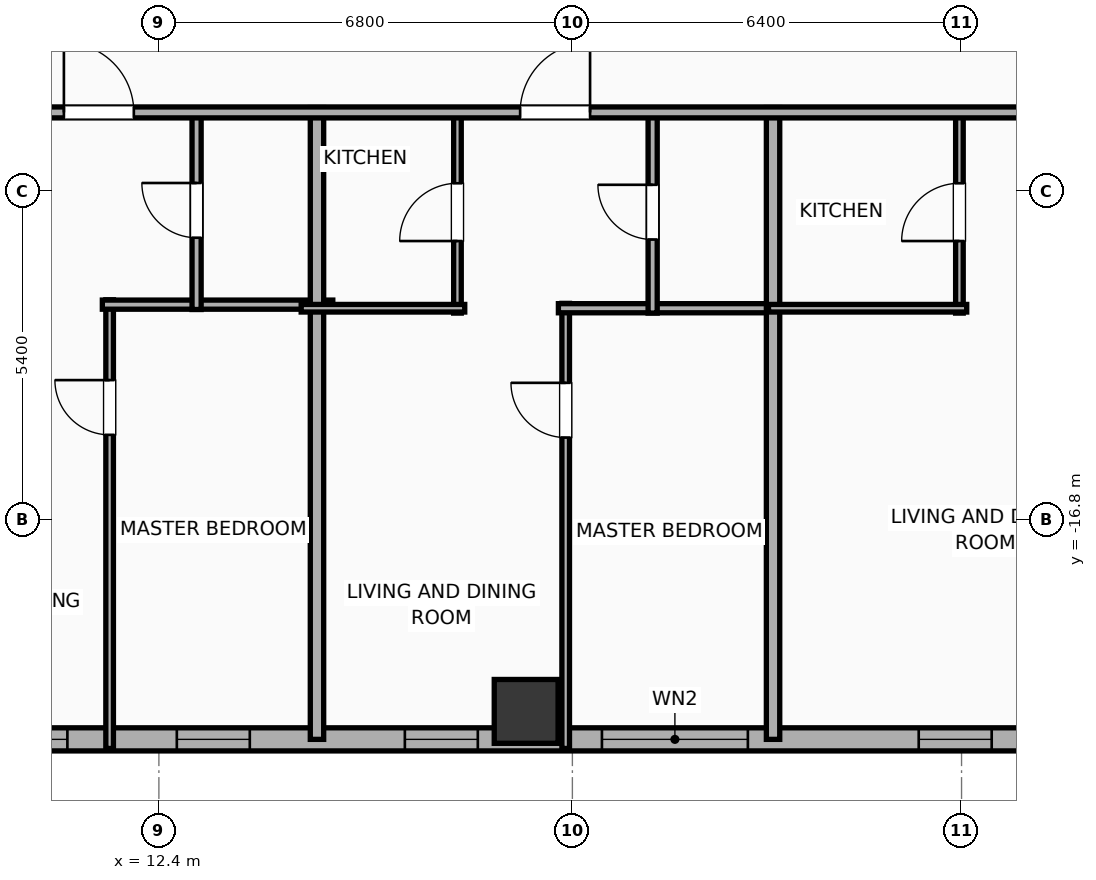
"""IFC4 building model, lengths in metres.
Left out: names, types, materials, properties, quantities, classifications, styles, units other than length and angle.
Written with IfcOpenShell. Run it as: python <this file> out.ifc"""

import sys

from ifc_helpers import new_model, si_unit, direction, frame, frame_2d, origin, origin_2d, place, context, subcontext, project, spatial, rectangle, hollow_rectangle, extrude, element, fill, save


model = new_model("IFC4")
c1 = context("Model", 3, precision=1e-05, world=origin(), true_north=direction((0.0, 1.0)))
c2 = subcontext(c1, "Body", "Model", "MODEL_VIEW")
j1 = project(units=[si_unit("LENGTHUNIT", "METRE"), si_unit("PLANEANGLEUNIT", "RADIAN")], contexts=[c1])
p1 = place(None, origin())
s1 = spatial("IfcSite", under=j1, at=p1, CompositionType="ELEMENT")
p2 = place(p1, origin())
s2 = spatial("IfcBuilding", under=s1, at=p2, CompositionType="ELEMENT")
p3 = place(p2, frame((0.0, 0.0, 136.5)))
s3 = spatial("IfcBuildingStorey", under=s2, at=p3, CompositionType="ELEMENT", Elevation=136.5)
p4 = place(p3, frame((18.44, -19.95, 0.0), z_axis=(0.0, 0.0, 1.0), x_axis=(1.0, 0.0, 0.0)))
e1 = element("IfcColumn", 1, at=p4, inside=s3, PredefinedType="COLUMN", context=c2, shape_type="SweptSolid", body=[
    extrude(hollow_rectangle(XDim=1.05, YDim=1.05, WallThickness=0.036, at=origin_2d()), origin(), (0.0, 0.0, 1.0), 3.865),
])
p5 = place(p3, frame((29.381, -20.41, 0.0), z_axis=(0.0, 0.0, 1.0), x_axis=(-1.0, 0.0, 0.0)))
e2 = element("IfcWall", 2, at=p5, inside=s3, PredefinedType="ELEMENTEDWALL", context=c2, shape_type="SweptSolid", body=[
    extrude(rectangle(XDim=54.763, YDim=0.38, at=frame_2d((27.381, 0.0))), origin(), (0.0, 0.0, 1.0), 2.39),
])
p6 = place(p5, frame((7.295, 0.0, 0.75)))
e3 = element("IfcOpeningElement", 3, at=p6, cuts=e2, PredefinedType="OPENING", context=c2, shape_type="SweptSolid", body=[
    extrude(rectangle(XDim=2.4, YDim=1.45, at=frame_2d((1.2, 0.725))), frame((0.0, 0.2, 0.0), z_axis=(0.0, -1.0, 0.0), x_axis=(1.0, 0.0, 0.0)), (0.0, 0.0, 1.0), 0.4),
])
p7 = place(p5, frame((18.486, 0.0, 0.75)))
e4 = element("IfcOpeningElement", 4, at=p7, cuts=e2, PredefinedType="OPENING", context=c2, shape_type="SweptSolid", body=[
    extrude(rectangle(XDim=2.4, YDim=1.45, at=frame_2d((1.2, 0.725))), frame((0.0, 0.2, 0.0), z_axis=(0.0, -1.0, 0.0), x_axis=(1.0, 0.0, 0.0)), (0.0, 0.0, 1.0), 0.4),
])
p8 = place(p5, frame((33.877, 0.0, 0.75)))
e5 = element("IfcOpeningElement", 5, at=p8, cuts=e2, PredefinedType="OPENING", context=c2, shape_type="SweptSolid", body=[
    extrude(rectangle(XDim=2.4, YDim=1.45, at=frame_2d((1.2, 0.725))), frame((0.0, 0.2, 0.0), z_axis=(0.0, -1.0, 0.0), x_axis=(1.0, 0.0, 0.0)), (0.0, 0.0, 1.0), 0.4),
])
p9 = place(p5, frame((48.367, 0.0, 0.75)))
e6 = element("IfcOpeningElement", 6, at=p9, cuts=e2, PredefinedType="OPENING", context=c2, shape_type="SweptSolid", body=[
    extrude(rectangle(XDim=2.4, YDim=1.45, at=frame_2d((1.2, 0.725))), frame((0.0, 0.2, 0.0), z_axis=(0.0, -1.0, 0.0), x_axis=(1.0, 0.0, 0.0)), (0.0, 0.0, 1.0), 0.4),
])
p10 = place(p5, frame((52.277, 0.0, 0.55)))
e7 = element("IfcOpeningElement", 7, at=p10, cuts=e2, PredefinedType="OPENING", context=c2, shape_type="SweptSolid", body=[
    extrude(rectangle(XDim=1.2, YDim=1.15, at=frame_2d((0.6, 0.575))), frame((0.0, 0.2, 0.0), z_axis=(0.0, -1.0, 0.0), x_axis=(1.0, 0.0, 0.0)), (0.0, 0.0, 1.0), 0.4),
])
p11 = place(p5, frame((45.486, 0.0, 0.55)))
e8 = element("IfcOpeningElement", 8, at=p11, cuts=e2, PredefinedType="OPENING", context=c2, shape_type="SweptSolid", body=[
    extrude(rectangle(XDim=1.2, YDim=1.15, at=frame_2d((0.6, 0.575))), frame((0.0, 0.2, 0.0), z_axis=(0.0, -1.0, 0.0), x_axis=(1.0, 0.0, 0.0)), (0.0, 0.0, 1.0), 0.4),
])
p12 = place(p5, frame((41.736, 0.0, 0.55)))
e9 = element("IfcOpeningElement", 9, at=p12, cuts=e2, PredefinedType="OPENING", context=c2, shape_type="SweptSolid", body=[
    extrude(rectangle(XDim=1.2, YDim=1.15, at=frame_2d((0.6, 0.575))), frame((0.0, 0.2, 0.0), z_axis=(0.0, -1.0, 0.0), x_axis=(1.0, 0.0, 0.0)), (0.0, 0.0, 1.0), 0.4),
])
p13 = place(p5, frame((37.986, 0.0, 0.55)))
e10 = element("IfcOpeningElement", 10, at=p13, cuts=e2, PredefinedType="OPENING", context=c2, shape_type="SweptSolid", body=[
    extrude(rectangle(XDim=1.2, YDim=1.15, at=frame_2d((0.6, 0.575))), frame((0.0, 0.2, 0.0), z_axis=(0.0, -1.0, 0.0), x_axis=(1.0, 0.0, 0.0)), (0.0, 0.0, 1.0), 0.4),
])
p14 = place(p5, frame((30.486, 0.0, 0.55)))
e11 = element("IfcOpeningElement", 11, at=p14, cuts=e2, PredefinedType="OPENING", context=c2, shape_type="SweptSolid", body=[
    extrude(rectangle(XDim=1.2, YDim=1.15, at=frame_2d((0.6, 0.575))), frame((0.0, 0.2, 0.0), z_axis=(0.0, -1.0, 0.0), x_axis=(1.0, 0.0, 0.0)), (0.0, 0.0, 1.0), 0.4),
])
p15 = place(p5, frame((26.736, 0.0, 0.55)))
e12 = element("IfcOpeningElement", 12, at=p15, cuts=e2, PredefinedType="OPENING", context=c2, shape_type="SweptSolid", body=[
    extrude(rectangle(XDim=1.2, YDim=1.15, at=frame_2d((0.6, 0.575))), frame((0.0, 0.2, 0.0), z_axis=(0.0, -1.0, 0.0), x_axis=(1.0, 0.0, 0.0)), (0.0, 0.0, 1.0), 0.4),
])
p16 = place(p5, frame((22.986, 0.0, 0.55)))
e13 = element("IfcOpeningElement", 13, at=p16, cuts=e2, PredefinedType="OPENING", context=c2, shape_type="SweptSolid", body=[
    extrude(rectangle(XDim=1.2, YDim=1.15, at=frame_2d((0.6, 0.575))), frame((0.0, 0.2, 0.0), z_axis=(0.0, -1.0, 0.0), x_axis=(1.0, 0.0, 0.0)), (0.0, 0.0, 1.0), 0.4),
])
p17 = place(p5, frame((15.486, 0.0, 0.55)))
e14 = element("IfcOpeningElement", 14, at=p17, cuts=e2, PredefinedType="OPENING", context=c2, shape_type="SweptSolid", body=[
    extrude(rectangle(XDim=1.2, YDim=1.15, at=frame_2d((0.6, 0.575))), frame((0.0, 0.2, 0.0), z_axis=(0.0, -1.0, 0.0), x_axis=(1.0, 0.0, 0.0)), (0.0, 0.0, 1.0), 0.4),
])
p18 = place(p5, frame((11.736, 0.0, 0.55)))
e15 = element("IfcOpeningElement", 15, at=p18, cuts=e2, PredefinedType="OPENING", context=c2, shape_type="SweptSolid", body=[
    extrude(rectangle(XDim=1.2, YDim=1.15, at=frame_2d((0.6, 0.575))), frame((0.0, 0.2, 0.0), z_axis=(0.0, -1.0, 0.0), x_axis=(1.0, 0.0, 0.0)), (0.0, 0.0, 1.0), 0.4),
])
p19 = place(p5, frame((3.286, 0.0, 0.55)))
e16 = element("IfcOpeningElement", 16, at=p19, cuts=e2, PredefinedType="OPENING", context=c2, shape_type="SweptSolid", body=[
    extrude(rectangle(XDim=1.2, YDim=1.15, at=frame_2d((0.6, 0.575))), frame((0.0, 0.2, 0.0), z_axis=(0.0, -1.0, 0.0), x_axis=(1.0, 0.0, 0.0)), (0.0, 0.0, 1.0), 0.4),
])
p20 = place(p3, frame((11.59, -20.56, 0.0), z_axis=(0.0, 0.0, 1.0), x_axis=(0.0, 1.0, 0.0)))
e17 = element("IfcWall", 17, at=p20, inside=s3, PredefinedType="PARTITIONING", context=c2, shape_type="SweptSolid", body=[
    extrude(rectangle(XDim=7.379, YDim=0.125, at=frame_2d((3.689, 0.0))), origin(), (0.0, 0.0, 1.0), 3.5),
])
p21 = place(p20, frame((5.158, 0.0, 0.0)))
e18 = element("IfcOpeningElement", 18, at=p21, cuts=e17, PredefinedType="OPENING", context=c2, shape_type="SweptSolid", body=[
    extrude(rectangle(XDim=0.9, YDim=2.05, at=frame_2d((0.45, 1.025))), frame((0.0, 0.073, 0.0), z_axis=(0.0, -1.0, 0.0), x_axis=(1.0, 0.0, 0.0)), (0.0, 0.0, 1.0), 0.145),
])
p22 = place(p3, frame((11.47, -13.261, 0.0), z_axis=(0.0, 0.0, 1.0), x_axis=(1.0, 0.0, 0.0)))
e19 = element("IfcWall", 19, at=p22, inside=s3, PredefinedType="PLUMBINGWALL", context=c2, shape_type="SweptSolid", body=[
    extrude(rectangle(XDim=3.79, YDim=0.15, at=frame_2d((1.895, 0.0))), origin(), (0.0, 0.0, 1.0), 3.5),
])
p23 = place(p3, frame((13.02, -13.341, 0.0), z_axis=(0.0, 0.0, 1.0), x_axis=(0.0, 1.0, 0.0)))
e20 = element("IfcWall", 20, at=p23, inside=s3, PredefinedType="PLUMBINGWALL", context=c2, shape_type="SweptSolid", body=[
    extrude(rectangle(XDim=3.261, YDim=0.15, at=frame_2d((1.63, 0.0))), origin(), (0.0, 0.0, 1.0), 3.5),
])
p24 = place(p23, frame((1.18, 0.0, 0.0)))
e21 = element("IfcOpeningElement", 21, at=p24, cuts=e20, PredefinedType="OPENING", context=c2, shape_type="SweptSolid", body=[
    extrude(rectangle(XDim=0.9, YDim=2.05, at=frame_2d((0.45, 1.025))), frame((0.0, 0.085, 0.0), z_axis=(0.0, -1.0, 0.0), x_axis=(1.0, 0.0, 0.0)), (0.0, 0.0, 1.0), 0.17),
])
p25 = place(p3, frame((15.0, -20.41, 0.0), z_axis=(0.0, 0.0, 1.0), x_axis=(0.0, 1.0, 0.0)))
e22 = element("IfcWall", 22, at=p25, inside=s3, PredefinedType="PARTITIONING", context=c2, shape_type="SweptSolid", body=[
    extrude(rectangle(XDim=10.39, YDim=0.22, at=frame_2d((5.195, 0.0))), origin(), (0.0, 0.0, 1.0), 2.39),
])
p26 = place(p3, frame((19.09, -20.56, 0.0), z_axis=(0.0, 0.0, 1.0), x_axis=(0.0, 1.0, 0.0)))
e23 = element("IfcWall", 23, at=p26, inside=s3, PredefinedType="PARTITIONING", context=c2, shape_type="SweptSolid", body=[
    extrude(rectangle(XDim=7.32, YDim=0.125, at=frame_2d((3.66, 0.0))), origin(), (0.0, 0.0, 1.0), 2.39),
])
p27 = place(p26, frame((5.113, 0.0, 0.0)))
e24 = element("IfcOpeningElement", 24, at=p27, cuts=e23, PredefinedType="OPENING", context=c2, shape_type="SweptSolid", body=[
    extrude(rectangle(XDim=0.9, YDim=2.05, at=frame_2d((0.45, 1.025))), frame((0.0, 0.073, 0.0), z_axis=(0.0, -1.0, 0.0), x_axis=(1.0, 0.0, 0.0)), (0.0, 0.0, 1.0), 0.145),
])
p28 = place(p3, frame((18.97, -13.32, 0.0), z_axis=(0.0, 0.0, 1.0), x_axis=(1.0, 0.0, 0.0)))
e25 = element("IfcWall", 25, at=p28, inside=s3, PredefinedType="PLUMBINGWALL", context=c2, shape_type="SweptSolid", body=[
    extrude(rectangle(XDim=3.605, YDim=0.15, at=frame_2d((1.802, 0.0))), origin(), (0.0, 0.0, 1.0), 3.5),
])
p29 = place(p3, frame((17.31, -13.4, 0.0), z_axis=(0.0, 0.0, 1.0), x_axis=(0.0, 1.0, 0.0)))
e26 = element("IfcWall", 26, at=p29, inside=s3, PredefinedType="PARTITIONING", context=c2, shape_type="SweptSolid", body=[
    extrude(rectangle(XDim=3.32, YDim=0.125, at=frame_2d((1.66, 0.0))), origin(), (0.0, 0.0, 1.0), 3.5),
])
p30 = place(p29, frame((1.185, 0.0, 0.0)))
e27 = element("IfcOpeningElement", 27, at=p30, cuts=e26, PredefinedType="OPENING", context=c2, shape_type="SweptSolid", body=[
    extrude(rectangle(XDim=0.95, YDim=2.05, at=frame_2d((0.475, 1.025))), frame((0.0, 0.073, 0.0), z_axis=(0.0, -1.0, 0.0), x_axis=(1.0, 0.0, 0.0)), (0.0, 0.0, 1.0), 0.145),
])
p31 = place(p3, frame((14.74, -13.32, 0.0), z_axis=(0.0, 0.0, 1.0), x_axis=(1.0, 0.0, 0.0)))
e28 = element("IfcWall", 28, at=p31, inside=s3, PredefinedType="PARTITIONING", context=c2, shape_type="SweptSolid", body=[
    extrude(rectangle(XDim=2.69, YDim=0.125, at=frame_2d((1.345, 0.0))), origin(), (0.0, 0.0, 1.0), 3.5),
])
p32 = place(p3, frame((20.52, -13.4, 0.0), z_axis=(0.0, 0.0, 1.0), x_axis=(0.0, 1.0, 0.0)))
e29 = element("IfcWall", 29, at=p32, inside=s3, PredefinedType="PLUMBINGWALL", context=c2, shape_type="SweptSolid", body=[
    extrude(rectangle(XDim=3.32, YDim=0.15, at=frame_2d((1.66, 0.0))), origin(), (0.0, 0.0, 1.0), 3.5),
])
p33 = place(p32, frame((1.21, 0.0, 0.0)))
e30 = element("IfcOpeningElement", 30, at=p33, cuts=e29, PredefinedType="OPENING", context=c2, shape_type="SweptSolid", body=[
    extrude(rectangle(XDim=0.9, YDim=2.05, at=frame_2d((0.45, 1.025))), frame((0.0, 0.085, 0.0), z_axis=(0.0, -1.0, 0.0), x_axis=(1.0, 0.0, 0.0)), (0.0, 0.0, 1.0), 0.17),
])
p34 = place(p3, frame((22.5, -20.41, 0.0), z_axis=(0.0, 0.0, 1.0), x_axis=(0.0, 1.0, 0.0)))
e31 = element("IfcWall", 31, at=p34, inside=s3, PredefinedType="PARTITIONING", context=c2, shape_type="SweptSolid", body=[
    extrude(rectangle(XDim=10.39, YDim=0.22, at=frame_2d((5.195, 0.0))), origin(), (0.0, 0.0, 1.0), 3.5),
])
p35 = place(p3, frame((25.565, -13.4, 0.0), z_axis=(0.0, 0.0, 1.0), x_axis=(0.0, 1.0, 0.0)))
e32 = element("IfcWall", 32, at=p35, inside=s3, PredefinedType="PARTITIONING", context=c2, shape_type="SweptSolid", body=[
    extrude(rectangle(XDim=3.32, YDim=0.125, at=frame_2d((1.66, 0.0))), origin(), (0.0, 0.0, 1.0), 3.5),
])
p36 = place(p35, frame((1.185, 0.0, 0.0)))
e33 = element("IfcOpeningElement", 33, at=p36, cuts=e32, PredefinedType="OPENING", context=c2, shape_type="SweptSolid", body=[
    extrude(rectangle(XDim=0.95, YDim=2.05, at=frame_2d((0.475, 1.025))), frame((0.0, 0.073, 0.0), z_axis=(0.0, -1.0, 0.0), x_axis=(1.0, 0.0, 0.0)), (0.0, 0.0, 1.0), 0.145),
])
p37 = place(p3, frame((22.425, -13.32, 0.0), z_axis=(0.0, 0.0, 1.0), x_axis=(1.0, 0.0, 0.0)))
e34 = element("IfcWall", 34, at=p37, inside=s3, PredefinedType="PARTITIONING", context=c2, shape_type="SweptSolid", body=[
    extrude(rectangle(XDim=3.26, YDim=0.125, at=frame_2d((1.63, 0.0))), origin(), (0.0, 0.0, 1.0), 3.5),
])
p38 = place(p3, frame((-29.21, -10.1, 0.0), z_axis=(0.0, 0.0, 1.0), x_axis=(1.0, 0.0, 0.0)))
e35 = element("IfcWall", 35, at=p38, inside=s3, PredefinedType="PARTITIONING", context=c2, shape_type="SweptSolid", body=[
    extrude(rectangle(XDim=62.42, YDim=0.18, at=frame_2d((31.21, 0.0))), origin(), (0.0, 0.0, 1.0), 2.39),
])
p39 = place(p38, frame((3.002, 0.0, 0.0)))
e36 = element("IfcOpeningElement", 36, at=p39, cuts=e35, PredefinedType="OPENING", context=c2, shape_type="SweptSolid", body=[
    extrude(rectangle(XDim=0.9, YDim=2.05, at=frame_2d((0.45, 1.025))), frame((0.0, 0.1, 0.0), z_axis=(0.0, -1.0, 0.0), x_axis=(1.0, 0.0, 0.0)), (0.0, 0.0, 1.0), 0.2),
])
p40 = place(p38, frame((10.049, 0.0, 0.0)))
e37 = element("IfcOpeningElement", 37, at=p40, cuts=e35, PredefinedType="OPENING", context=c2, shape_type="SweptSolid", body=[
    extrude(rectangle(XDim=1.15, YDim=2.05, at=frame_2d((0.575, 1.025))), frame((0.0, 0.1, 0.0), z_axis=(0.0, -1.0, 0.0), x_axis=(1.0, 0.0, 0.0)), (0.0, 0.0, 1.0), 0.2),
])
p41 = place(p38, frame((17.552, 0.0, 0.0)))
e38 = element("IfcOpeningElement", 38, at=p41, cuts=e35, PredefinedType="OPENING", context=c2, shape_type="SweptSolid", body=[
    extrude(rectangle(XDim=1.15, YDim=2.05, at=frame_2d((0.575, 1.025))), frame((0.0, 0.1, 0.0), z_axis=(0.0, -1.0, 0.0), x_axis=(1.0, 0.0, 0.0)), (0.0, 0.0, 1.0), 0.2),
])
p42 = place(p38, frame((25.048, 0.0, 0.0)))
e39 = element("IfcOpeningElement", 39, at=p42, cuts=e35, PredefinedType="OPENING", context=c2, shape_type="SweptSolid", body=[
    extrude(rectangle(XDim=1.15, YDim=2.05, at=frame_2d((0.575, 1.025))), frame((0.0, 0.1, 0.0), z_axis=(0.0, -1.0, 0.0), x_axis=(1.0, 0.0, 0.0)), (0.0, 0.0, 1.0), 0.2),
])
p43 = place(p38, frame((32.551, 0.0, 0.0)))
e40 = element("IfcOpeningElement", 40, at=p43, cuts=e35, PredefinedType="OPENING", context=c2, shape_type="SweptSolid", body=[
    extrude(rectangle(XDim=1.15, YDim=2.05, at=frame_2d((0.575, 1.025))), frame((0.0, 0.1, 0.0), z_axis=(0.0, -1.0, 0.0), x_axis=(1.0, 0.0, 0.0)), (0.0, 0.0, 1.0), 0.2),
])
p44 = place(p38, frame((40.048, 0.0, 0.0)))
e41 = element("IfcOpeningElement", 41, at=p44, cuts=e35, PredefinedType="OPENING", context=c2, shape_type="SweptSolid", body=[
    extrude(rectangle(XDim=1.15, YDim=2.05, at=frame_2d((0.575, 1.025))), frame((0.0, 0.1, 0.0), z_axis=(0.0, -1.0, 0.0), x_axis=(1.0, 0.0, 0.0)), (0.0, 0.0, 1.0), 0.2),
])
p45 = place(p38, frame((47.551, 0.0, 0.0)))
e42 = element("IfcOpeningElement", 42, at=p45, cuts=e35, PredefinedType="OPENING", context=c2, shape_type="SweptSolid", body=[
    extrude(rectangle(XDim=1.15, YDim=2.05, at=frame_2d((0.575, 1.025))), frame((0.0, 0.1, 0.0), z_axis=(0.0, -1.0, 0.0), x_axis=(1.0, 0.0, 0.0)), (0.0, 0.0, 1.0), 0.2),
])
p46 = place(p38, frame((57.064, 0.0, 0.0)))
e43 = element("IfcOpeningElement", 43, at=p46, cuts=e35, PredefinedType="OPENING", context=c2, shape_type="SweptSolid", body=[
    extrude(rectangle(XDim=1.15, YDim=2.05, at=frame_2d((0.575, 1.025))), frame((0.0, 0.1, 0.0), z_axis=(0.0, -1.0, 0.0), x_axis=(1.0, 0.0, 0.0)), (0.0, 0.0, 1.0), 0.2),
])
p47 = place(p6, origin())
e44 = element("IfcWindow", 44, at=p47, inside=s3, PartitioningType="SINGLE_PANEL", PredefinedType="WINDOW", context=c2, shape_type="SweptSolid", body=[
    extrude(rectangle(XDim=2.4, YDim=1.45, at=frame_2d((1.2, 0.725))), frame((0.0, 0.03, 0.0), z_axis=(0.0, -1.0, 0.0), x_axis=(1.0, 0.0, 0.0)), (0.0, 0.0, 1.0), 0.06),
])
fill(e3, e44)
p48 = place(p7, origin())
e45 = element("IfcWindow", 45, at=p48, inside=s3, PartitioningType="SINGLE_PANEL", PredefinedType="WINDOW", context=c2, shape_type="SweptSolid", body=[
    extrude(rectangle(XDim=2.4, YDim=1.45, at=frame_2d((1.2, 0.725))), frame((0.0, 0.03, 0.0), z_axis=(0.0, -1.0, 0.0), x_axis=(1.0, 0.0, 0.0)), (0.0, 0.0, 1.0), 0.06),
])
fill(e4, e45)
p49 = place(p17, origin())
e46 = element("IfcWindow", 46, at=p49, inside=s3, PartitioningType="SINGLE_PANEL", PredefinedType="WINDOW", context=c2, shape_type="SweptSolid", body=[
    extrude(rectangle(XDim=1.2, YDim=1.15, at=frame_2d((0.6, 0.575))), frame((0.0, 0.03, 0.0), z_axis=(0.0, -1.0, 0.0), x_axis=(1.0, 0.0, 0.0)), (0.0, 0.0, 1.0), 0.06),
])
fill(e14, e46)
p50 = place(p18, origin())
e47 = element("IfcWindow", 47, at=p50, inside=s3, PartitioningType="SINGLE_PANEL", PredefinedType="WINDOW", context=c2, shape_type="SweptSolid", body=[
    extrude(rectangle(XDim=1.2, YDim=1.15, at=frame_2d((0.6, 0.575))), frame((0.0, 0.03, 0.0), z_axis=(0.0, -1.0, 0.0), x_axis=(1.0, 0.0, 0.0)), (0.0, 0.0, 1.0), 0.06),
])
fill(e15, e47)
p51 = place(p19, origin())
e48 = element("IfcWindow", 48, at=p51, inside=s3, PartitioningType="SINGLE_PANEL", PredefinedType="WINDOW", context=c2, shape_type="SweptSolid", body=[
    extrude(rectangle(XDim=1.2, YDim=1.15, at=frame_2d((0.6, 0.575))), frame((0.0, 0.03, 0.0), z_axis=(0.0, -1.0, 0.0), x_axis=(1.0, 0.0, 0.0)), (0.0, 0.0, 1.0), 0.06),
])
fill(e16, e48)
p52 = place(p21, origin())
e49 = element("IfcDoor", 49, at=p52, inside=s3, OperationType="SINGLE_SWING_RIGHT", PredefinedType="DOOR", context=c2, shape_type="SweptSolid", body=[
    extrude(rectangle(XDim=0.9, YDim=2.05, at=frame_2d((0.45, 1.025))), frame((0.0, 0.025, 0.0), z_axis=(0.0, -1.0, 0.0), x_axis=(1.0, 0.0, 0.0)), (0.0, 0.0, 1.0), 0.05),
])
fill(e18, e49)
p53 = place(p24, origin())
e50 = element("IfcDoor", 50, at=p53, inside=s3, OperationType="SINGLE_SWING_RIGHT", PredefinedType="DOOR", context=c2, shape_type="SweptSolid", body=[
    extrude(rectangle(XDim=0.9, YDim=2.05, at=frame_2d((0.45, 1.025))), frame((0.0, 0.025, 0.0), z_axis=(0.0, -1.0, 0.0), x_axis=(1.0, 0.0, 0.0)), (0.0, 0.0, 1.0), 0.05),
])
fill(e21, e50)
p54 = place(p27, origin())
e51 = element("IfcDoor", 51, at=p54, inside=s3, OperationType="SINGLE_SWING_RIGHT", PredefinedType="DOOR", context=c2, shape_type="SweptSolid", body=[
    extrude(rectangle(XDim=0.9, YDim=2.05, at=frame_2d((0.45, 1.025))), frame((0.0, 0.025, 0.0), z_axis=(0.0, -1.0, 0.0), x_axis=(1.0, 0.0, 0.0)), (0.0, 0.0, 1.0), 0.05),
])
fill(e24, e51)
p55 = place(p30, origin())
e52 = element("IfcDoor", 52, at=p55, inside=s3, OperationType="SINGLE_SWING_LEFT", PredefinedType="DOOR", context=c2, shape_type="SweptSolid", body=[
    extrude(rectangle(XDim=0.95, YDim=2.05, at=frame_2d((0.475, 1.025))), frame((0.0, 0.025, 0.0), z_axis=(0.0, -1.0, 0.0), x_axis=(1.0, 0.0, 0.0)), (0.0, 0.0, 1.0), 0.05),
])
fill(e27, e52)
p56 = place(p33, origin())
e53 = element("IfcDoor", 53, at=p56, inside=s3, OperationType="SINGLE_SWING_RIGHT", PredefinedType="DOOR", context=c2, shape_type="SweptSolid", body=[
    extrude(rectangle(XDim=0.9, YDim=2.05, at=frame_2d((0.45, 1.025))), frame((0.0, 0.025, 0.0), z_axis=(0.0, -1.0, 0.0), x_axis=(1.0, 0.0, 0.0)), (0.0, 0.0, 1.0), 0.05),
])
fill(e30, e53)
p57 = place(p36, origin())
e54 = element("IfcDoor", 54, at=p57, inside=s3, OperationType="SINGLE_SWING_LEFT", PredefinedType="DOOR", context=c2, shape_type="SweptSolid", body=[
    extrude(rectangle(XDim=0.95, YDim=2.05, at=frame_2d((0.475, 1.025))), frame((0.0, 0.025, 0.0), z_axis=(0.0, -1.0, 0.0), x_axis=(1.0, 0.0, 0.0)), (0.0, 0.0, 1.0), 0.05),
])
fill(e33, e54)
p58 = place(p44, origin())
e55 = element("IfcDoor", 55, at=p58, inside=s3, OperationType="SINGLE_SWING_LEFT", PredefinedType="DOOR", context=c2, shape_type="SweptSolid", body=[
    extrude(rectangle(XDim=1.15, YDim=2.05, at=frame_2d((0.575, 1.025))), frame((0.0, 0.025, 0.0), z_axis=(0.0, -1.0, 0.0), x_axis=(1.0, 0.0, 0.0)), (0.0, 0.0, 1.0), 0.05),
])
fill(e41, e55)
p59 = place(p45, origin())
e56 = element("IfcDoor", 56, at=p59, inside=s3, OperationType="SINGLE_SWING_RIGHT", PredefinedType="DOOR", context=c2, shape_type="SweptSolid", body=[
    extrude(rectangle(XDim=1.15, YDim=2.05, at=frame_2d((0.575, 1.025))), frame((0.0, 0.025, 0.0), z_axis=(0.0, -1.0, 0.0), x_axis=(1.0, 0.0, 0.0)), (0.0, 0.0, 1.0), 0.05),
])
fill(e42, e56)
save(model, sys.argv[1])
